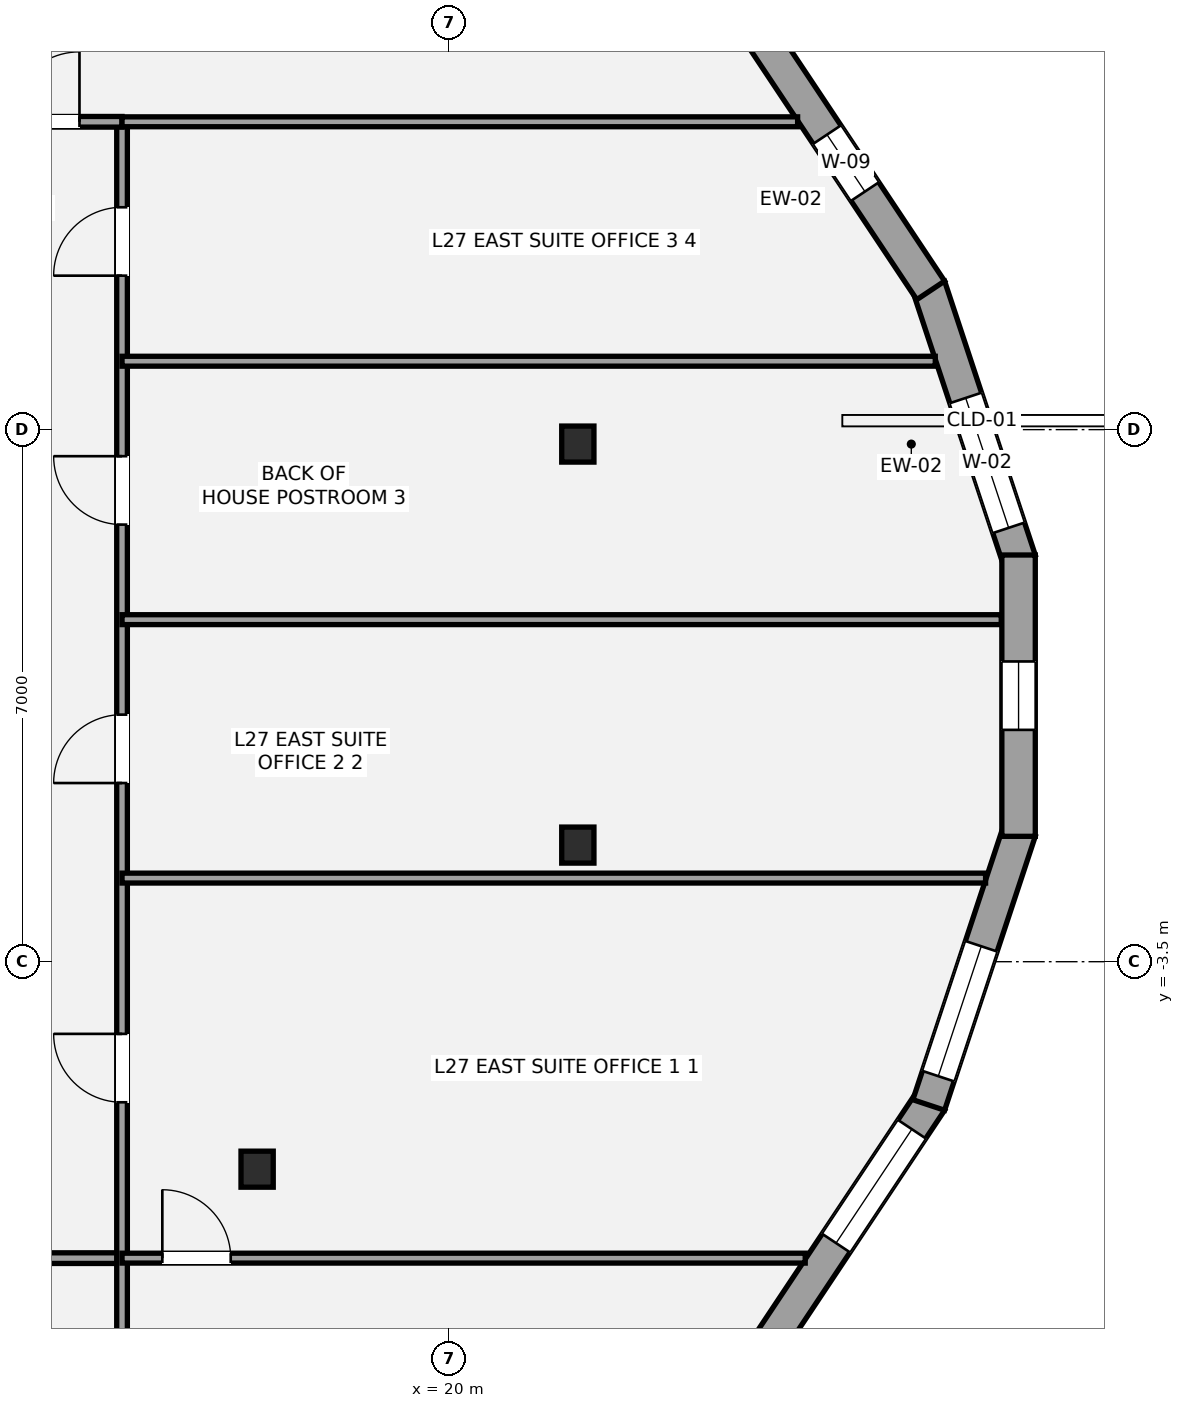
"""IFC4 building model, lengths in metres.
Left out: names, types, materials, properties, quantities, classifications, styles, units other than length and angle.
Written with IfcOpenShell. Run it as: python <this file> out.ifc"""

import sys

from ifc_helpers import new_model, si_unit, direction, frame, frame_2d, origin, origin_2d, place, context, subcontext, project, spatial, rectangle, i_section, extrude, element, fill, save


model = new_model("IFC4")
c1 = context("Model", 3, precision=1e-05, world=origin(), true_north=direction((0.0, 1.0)))
c2 = subcontext(c1, "Body", "Model", "MODEL_VIEW")
j1 = project(units=[si_unit("LENGTHUNIT", "METRE"), si_unit("PLANEANGLEUNIT", "RADIAN")], contexts=[c1])
p1 = place(None, origin())
s1 = spatial("IfcSite", under=j1, at=p1, CompositionType="ELEMENT")
p2 = place(p1, origin())
s2 = spatial("IfcBuilding", under=s1, at=p2, CompositionType="ELEMENT")
p3 = place(p2, frame((0.0, 0.0, 103.6)))
s3 = spatial("IfcBuildingStorey", under=s2, at=p3, CompositionType="ELEMENT", Elevation=103.6)
for number, where, z_axis, x_axis in (
    (1, (21.697, 3.31, 0.0), (0.0, 0.0, 1.0), (1.0, 0.0, 0.0)),
    (2, (17.477, -6.229, 0.0), (0.0, 0.0, 1.0), (1.0, 0.0, 0.0)),
    (3, (21.697, -1.966, 0.0), (0.0, 0.0, 1.0), (1.0, 0.0, 0.0)),
):
    element("IfcColumn", number, at=place(p3, frame(where, z_axis=z_axis, x_axis=x_axis)), inside=s3, PredefinedType="COLUMN", context=c2, shape_type="SweptSolid", body=[
        extrude(i_section(OverallWidth=0.424, OverallDepth=0.474, WebThickness=0.048, FlangeThickness=0.077, at=origin_2d()), origin(), (0.0, 0.0, 1.0), 3.5),
    ])
p4 = place(p3, frame((26.314, 5.385, 0.0), z_axis=(0.0, 0.0, 1.0), x_axis=(0.314316911692, -0.94931811266, 0.0)))
e4 = element("IfcWall", 4, at=p4, inside=s3, PredefinedType="STANDARD", context=c2, shape_type="SweptSolid", body=[
    extrude(rectangle(XDim=3.796, YDim=0.44, at=frame_2d((1.898, 0.0))), origin(), (0.0, 0.0, 1.0), 2.528),
])
p5 = place(p4, frame((1.547, 0.0, 0.65)))
e5 = element("IfcOpeningElement", 5, at=p5, cuts=e4, PredefinedType="OPENING", context=c2, shape_type="SweptSolid", body=[
    extrude(rectangle(XDim=1.8, YDim=1.7, at=frame_2d((0.9, 0.85))), frame((0.0, 0.23, 0.0), z_axis=(0.0, -1.0, 0.0), x_axis=(1.0, 0.0, 0.0)), (0.0, 0.0, 1.0), 0.46),
])
p6 = place(p3, frame((24.11, 8.68, 0.0), z_axis=(0.0, 0.0, 1.0), x_axis=(0.554293965046, -0.83232097193, 0.0)))
e6 = element("IfcWall", 6, at=p6, inside=s3, PredefinedType="STANDARD", context=c2, shape_type="SweptSolid", body=[
    extrude(rectangle(XDim=4.023, YDim=0.44, at=frame_2d((2.011, 0.0))), origin(), (0.0, 0.0, 1.0), 2.528),
])
p7 = place(p6, frame((1.561, 0.0, 0.58)))
e7 = element("IfcOpeningElement", 7, at=p7, cuts=e6, PredefinedType="OPENING", context=c2, shape_type="SweptSolid", body=[
    extrude(rectangle(XDim=0.9, YDim=1.35, at=frame_2d((0.45, 0.675))), frame((0.0, 0.23, 0.0), z_axis=(0.0, -1.0, 0.0), x_axis=(1.0, 0.0, 0.0)), (0.0, 0.0, 1.0), 0.46),
])
p8 = place(p3, frame((26.34, -5.332, 0.0), z_axis=(0.0, 0.0, 1.0), x_axis=(-0.554293965046, -0.83232097193, 0.0)))
e8 = element("IfcWall", 8, at=p8, inside=s3, PredefinedType="STANDARD", context=c2, shape_type="SweptSolid", body=[
    extrude(rectangle(XDim=4.023, YDim=0.44, at=frame_2d((2.011, 0.0))), origin(), (0.0, 0.0, 1.0), 2.528),
])
p9 = place(p8, frame((0.446, 0.0, 0.65)))
e9 = element("IfcOpeningElement", 9, at=p9, cuts=e8, PredefinedType="OPENING", context=c2, shape_type="SweptSolid", body=[
    extrude(rectangle(XDim=1.8, YDim=1.7, at=frame_2d((0.9, 0.85))), frame((0.0, 0.23, 0.0), z_axis=(0.0, -1.0, 0.0), x_axis=(1.0, 0.0, 0.0)), (0.0, 0.0, 1.0), 0.46),
])
p10 = place(p3, frame((27.507, -1.781, 0.0), z_axis=(0.0, 0.0, 1.0), x_axis=(-0.314316911692, -0.94931811266, 0.0)))
e10 = element("IfcWall", 10, at=p10, inside=s3, PredefinedType="STANDARD", context=c2, shape_type="SweptSolid", body=[
    extrude(rectangle(XDim=3.796, YDim=0.44, at=frame_2d((1.898, 0.0))), origin(), (0.0, 0.0, 1.0), 2.528),
])
p11 = place(p10, frame((1.596, 0.0, 0.65)))
e11 = element("IfcOpeningElement", 11, at=p11, cuts=e10, PredefinedType="OPENING", context=c2, shape_type="SweptSolid", body=[
    extrude(rectangle(XDim=1.8, YDim=1.7, at=frame_2d((0.9, 0.85))), frame((0.0, 0.23, 0.0), z_axis=(0.0, -1.0, 0.0), x_axis=(1.0, 0.0, 0.0)), (0.0, 0.0, 1.0), 0.46),
])
p12 = place(p3, frame((27.496, 1.851, 0.0), z_axis=(0.0, 0.0, 1.0), x_axis=(0.0, -1.0, 0.0)))
e12 = element("IfcWall", 12, at=p12, inside=s3, PredefinedType="STANDARD", context=c2, shape_type="SweptSolid", body=[
    extrude(rectangle(XDim=3.701, YDim=0.44, at=frame_2d((1.851, 0.0))), origin(), (0.0, 0.0, 1.0), 2.528),
])
p13 = place(p12, frame((1.4, 0.0, 0.58)))
e13 = element("IfcOpeningElement", 13, at=p13, cuts=e12, PredefinedType="OPENING", context=c2, shape_type="SweptSolid", body=[
    extrude(rectangle(XDim=0.9, YDim=1.35, at=frame_2d((0.45, 0.675))), frame((0.0, 0.23, 0.0), z_axis=(0.0, -1.0, 0.0), x_axis=(1.0, 0.0, 0.0)), (0.0, 0.0, 1.0), 0.46),
])
p14 = place(p3, frame((-17.5, -7.4, 0.0), z_axis=(0.0, 0.0, 1.0), x_axis=(1.0, 0.0, 0.0)))
e14 = element("IfcWall", 14, at=p14, inside=s3, PredefinedType="PARTITIONING", context=c2, shape_type="SweptSolid", body=[
    extrude(rectangle(XDim=33.2, YDim=0.14, at=frame_2d((16.6, 0.0))), origin(), (0.0, 0.0, 1.0), 2.688),
])
p15 = place(p14, frame((6.3, 0.0, 0.0)))
e15 = element("IfcOpeningElement", 15, at=p15, cuts=e14, PredefinedType="OPENING", context=c2, shape_type="SweptSolid", body=[
    extrude(rectangle(XDim=0.9, YDim=2.1, at=frame_2d((0.45, 1.05))), frame((0.0, 0.08, 0.0), z_axis=(0.0, -1.0, 0.0), x_axis=(1.0, 0.0, 0.0)), (0.0, 0.0, 1.0), 0.16),
])
p16 = place(p14, frame((18.05, 0.0, 0.0)))
e16 = element("IfcOpeningElement", 16, at=p16, cuts=e14, PredefinedType="OPENING", context=c2, shape_type="SweptSolid", body=[
    extrude(rectangle(XDim=0.9, YDim=2.1, at=frame_2d((0.45, 1.05))), frame((0.0, 0.08, 0.0), z_axis=(0.0, -1.0, 0.0), x_axis=(1.0, 0.0, 0.0)), (0.0, 0.0, 1.0), 0.16),
])
p17 = place(p14, frame((27.9, 0.0, 0.0)))
e17 = element("IfcOpeningElement", 17, at=p17, cuts=e14, PredefinedType="OPENING", context=c2, shape_type="SweptSolid", body=[
    extrude(rectangle(XDim=0.9, YDim=2.1, at=frame_2d((0.45, 1.05))), frame((0.0, 0.08, 0.0), z_axis=(0.0, -1.0, 0.0), x_axis=(1.0, 0.0, 0.0)), (0.0, 0.0, 1.0), 0.16),
])
p18 = place(p3, frame((15.7, -14.675, 0.0), z_axis=(0.0, 0.0, 1.0), x_axis=(0.0, 1.0, 0.0)))
e18 = element("IfcWall", 18, at=p18, inside=s3, PredefinedType="PARTITIONING", context=c2, shape_type="SweptSolid", body=[
    extrude(rectangle(XDim=22.225, YDim=0.14, at=frame_2d((11.112, 0.0))), origin(), (0.0, 0.0, 1.0), 2.763),
])
p19 = place(p18, frame((9.325, 0.0, 0.0)))
e19 = element("IfcOpeningElement", 19, at=p19, cuts=e18, PredefinedType="OPENING", context=c2, shape_type="SweptSolid", body=[
    extrude(rectangle(XDim=0.9, YDim=2.1, at=frame_2d((0.45, 1.05))), frame((0.0, 0.08, 0.0), z_axis=(0.0, -1.0, 0.0), x_axis=(1.0, 0.0, 0.0)), (0.0, 0.0, 1.0), 0.16),
])
p20 = place(p18, frame((13.525, 0.0, 0.0)))
e20 = element("IfcOpeningElement", 20, at=p20, cuts=e18, PredefinedType="OPENING", context=c2, shape_type="SweptSolid", body=[
    extrude(rectangle(XDim=0.9, YDim=2.1, at=frame_2d((0.45, 1.05))), frame((0.0, 0.08, 0.0), z_axis=(0.0, -1.0, 0.0), x_axis=(1.0, 0.0, 0.0)), (0.0, 0.0, 1.0), 0.16),
])
p21 = place(p18, frame((16.925, 0.0, 0.0)))
e21 = element("IfcOpeningElement", 21, at=p21, cuts=e18, PredefinedType="OPENING", context=c2, shape_type="SweptSolid", body=[
    extrude(rectangle(XDim=0.9, YDim=2.1, at=frame_2d((0.45, 1.05))), frame((0.0, 0.08, 0.0), z_axis=(0.0, -1.0, 0.0), x_axis=(1.0, 0.0, 0.0)), (0.0, 0.0, 1.0), 0.16),
])
p22 = place(p18, frame((20.2, 0.0, 0.0)))
e22 = element("IfcOpeningElement", 22, at=p22, cuts=e18, PredefinedType="OPENING", context=c2, shape_type="SweptSolid", body=[
    extrude(rectangle(XDim=0.9, YDim=2.1, at=frame_2d((0.45, 1.05))), frame((0.0, 0.08, 0.0), z_axis=(0.0, -1.0, 0.0), x_axis=(1.0, 0.0, 0.0)), (0.0, 0.0, 1.0), 0.16),
])
p23 = place(p3, frame((13.9, 7.55, 0.0), z_axis=(0.0, 0.0, 1.0), x_axis=(1.0, 0.0, 0.0)))
e23 = element("IfcWall", 23, at=p23, inside=s3, PredefinedType="PARTITIONING", context=c2, shape_type="SweptSolid", body=[
    extrude(rectangle(XDim=1.8, YDim=0.14, at=frame_2d((0.9, 0.0))), origin(), (0.0, 0.0, 1.0), 2.763),
])
p24 = place(p23, frame((0.32, 0.0, 0.0)))
e24 = element("IfcOpeningElement", 24, at=p24, cuts=e23, PredefinedType="OPENING", context=c2, shape_type="SweptSolid", body=[
    extrude(rectangle(XDim=0.92, YDim=2.15, at=frame_2d((0.46, 1.075))), frame((0.0, 0.08, 0.0), z_axis=(0.0, -1.0, 0.0), x_axis=(1.0, 0.0, 0.0)), (0.0, 0.0, 1.0), 0.16),
])
p25 = place(p3, frame((15.7, 7.55, 0.0), z_axis=(0.0, 0.0, 1.0), x_axis=(1.0, 0.0, 0.0)))
e25 = element("IfcWall", 25, at=p25, inside=s3, PredefinedType="PARTITIONING", context=c2, shape_type="SweptSolid", body=[
    extrude(rectangle(XDim=8.889, YDim=0.13, at=frame_2d((4.444, 0.0))), origin(), (0.0, 0.0, 1.0), 2.763),
])
p26 = place(p3, frame((15.7, -7.4, 0.0), z_axis=(0.0, 0.0, 1.0), x_axis=(1.0, 0.0, 0.0)))
e26 = element("IfcWall", 26, at=p26, inside=s3, PredefinedType="PARTITIONING", context=c2, shape_type="SweptSolid", body=[
    extrude(rectangle(XDim=8.989, YDim=0.13, at=frame_2d((4.494, 0.0))), origin(), (0.0, 0.0, 1.0), 2.763),
])
p27 = place(p26, frame((0.53, 0.0, 0.0)))
e27 = element("IfcOpeningElement", 27, at=p27, cuts=e26, PredefinedType="OPENING", context=c2, shape_type="SweptSolid", body=[
    extrude(rectangle(XDim=0.9, YDim=2.1, at=frame_2d((0.45, 1.05))), frame((0.0, 0.075, 0.0), z_axis=(0.0, -1.0, 0.0), x_axis=(1.0, 0.0, 0.0)), (0.0, 0.0, 1.0), 0.15),
])
p28 = place(p3, frame((15.7, -2.4, 0.0), z_axis=(0.0, 0.0, 1.0), x_axis=(1.0, 0.0, 0.0)))
e28 = element("IfcWall", 28, at=p28, inside=s3, PredefinedType="PARTITIONING", context=c2, shape_type="SweptSolid", body=[
    extrude(rectangle(XDim=11.362, YDim=0.13, at=frame_2d((5.681, 0.0))), origin(), (0.0, 0.0, 1.0), 2.688),
])
p29 = place(p3, frame((15.7, 1.0, 0.0), z_axis=(0.0, 0.0, 1.0), x_axis=(1.0, 0.0, 0.0)))
e29 = element("IfcWall", 29, at=p29, inside=s3, PredefinedType="PARTITIONING", context=c2, shape_type="SweptSolid", body=[
    extrude(rectangle(XDim=11.568, YDim=0.13, at=frame_2d((5.784, 0.0))), origin(), (0.0, 0.0, 1.0), 2.763),
])
p30 = place(p3, frame((15.7, 4.4, 0.0), z_axis=(0.0, 0.0, 1.0), x_axis=(1.0, 0.0, 0.0)))
e30 = element("IfcWall", 30, at=p30, inside=s3, PredefinedType="PARTITIONING", context=c2, shape_type="SweptSolid", body=[
    extrude(rectangle(XDim=10.7, YDim=0.13, at=frame_2d((5.35, 0.0))), origin(), (0.0, 0.0, 1.0), 2.763),
])
p31 = place(p5, origin())
e31 = element("IfcWindow", 31, at=p31, inside=s3, PartitioningType="SINGLE_PANEL", PredefinedType="WINDOW", context=c2, shape_type="SweptSolid", body=[
    extrude(rectangle(XDim=1.8, YDim=1.7, at=frame_2d((0.9, 0.85))), frame((0.0, -0.01, 0.0), z_axis=(0.0, -1.0, 0.0), x_axis=(1.0, 0.0, 0.0)), (0.0, 0.0, 1.0), 0.06),
])
fill(e5, e31)
p32 = place(p7, origin())
e32 = element("IfcWindow", 32, at=p32, inside=s3, PartitioningType="SINGLE_PANEL", PredefinedType="WINDOW", context=c2, shape_type="SweptSolid", body=[
    extrude(rectangle(XDim=0.9, YDim=1.35, at=frame_2d((0.45, 0.675))), frame((0.0, -0.01, 0.0), z_axis=(0.0, -1.0, 0.0), x_axis=(1.0, 0.0, 0.0)), (0.0, 0.0, 1.0), 0.06),
])
fill(e7, e32)
p33 = place(p9, origin())
e33 = element("IfcWindow", 33, at=p33, inside=s3, PartitioningType="SINGLE_PANEL", PredefinedType="WINDOW", context=c2, shape_type="SweptSolid", body=[
    extrude(rectangle(XDim=1.8, YDim=1.7, at=frame_2d((0.9, 0.85))), frame((0.0, -0.01, 0.0), z_axis=(0.0, -1.0, 0.0), x_axis=(1.0, 0.0, 0.0)), (0.0, 0.0, 1.0), 0.06),
])
fill(e9, e33)
p34 = place(p11, origin())
e34 = element("IfcWindow", 34, at=p34, inside=s3, PartitioningType="SINGLE_PANEL", PredefinedType="WINDOW", context=c2, shape_type="SweptSolid", body=[
    extrude(rectangle(XDim=1.8, YDim=1.7, at=frame_2d((0.9, 0.85))), frame((0.0, -0.01, 0.0), z_axis=(0.0, -1.0, 0.0), x_axis=(1.0, 0.0, 0.0)), (0.0, 0.0, 1.0), 0.06),
])
fill(e11, e34)
p35 = place(p13, origin())
e35 = element("IfcWindow", 35, at=p35, inside=s3, PartitioningType="SINGLE_PANEL", PredefinedType="WINDOW", context=c2, shape_type="SweptSolid", body=[
    extrude(rectangle(XDim=0.9, YDim=1.35, at=frame_2d((0.45, 0.675))), frame((0.0, -0.01, 0.0), z_axis=(0.0, -1.0, 0.0), x_axis=(1.0, 0.0, 0.0)), (0.0, 0.0, 1.0), 0.06),
])
fill(e13, e35)
p36 = place(p24, origin())
e36 = element("IfcDoor", 36, at=p36, inside=s3, OperationType="SINGLE_SWING_RIGHT", PredefinedType="DOOR", context=c2, shape_type="SweptSolid", body=[
    extrude(rectangle(XDim=0.92, YDim=2.15, at=frame_2d((0.46, 1.075))), frame((0.0, 0.025, 0.0), z_axis=(0.0, -1.0, 0.0), x_axis=(1.0, 0.0, 0.0)), (0.0, 0.0, 1.0), 0.05),
])
fill(e24, e36)
p37 = place(p27, origin())
e37 = element("IfcDoor", 37, at=p37, inside=s3, OperationType="SINGLE_SWING_LEFT", PredefinedType="DOOR", context=c2, shape_type="SweptSolid", body=[
    extrude(rectangle(XDim=0.9, YDim=2.1, at=frame_2d((0.45, 1.05))), frame((0.0, 0.025, 0.0), z_axis=(0.0, -1.0, 0.0), x_axis=(1.0, 0.0, 0.0)), (0.0, 0.0, 1.0), 0.05),
])
fill(e27, e37)
p38 = place(p19, origin())
e38 = element("IfcDoor", 38, at=p38, inside=s3, OperationType="SINGLE_SWING_RIGHT", PredefinedType="DOOR", context=c2, shape_type="SweptSolid", body=[
    extrude(rectangle(XDim=0.9, YDim=2.1, at=frame_2d((0.45, 1.05))), frame((0.0, 0.025, 0.0), z_axis=(0.0, -1.0, 0.0), x_axis=(1.0, 0.0, 0.0)), (0.0, 0.0, 1.0), 0.05),
])
fill(e19, e38)
p39 = place(p20, origin())
e39 = element("IfcDoor", 39, at=p39, inside=s3, OperationType="SINGLE_SWING_LEFT", PredefinedType="DOOR", context=c2, shape_type="SweptSolid", body=[
    extrude(rectangle(XDim=0.9, YDim=2.1, at=frame_2d((0.45, 1.05))), frame((0.0, 0.025, 0.0), z_axis=(0.0, -1.0, 0.0), x_axis=(1.0, 0.0, 0.0)), (0.0, 0.0, 1.0), 0.05),
])
fill(e20, e39)
p40 = place(p21, origin())
e40 = element("IfcDoor", 40, at=p40, inside=s3, OperationType="SINGLE_SWING_RIGHT", PredefinedType="DOOR", context=c2, shape_type="SweptSolid", body=[
    extrude(rectangle(XDim=0.9, YDim=2.1, at=frame_2d((0.45, 1.05))), frame((0.0, 0.025, 0.0), z_axis=(0.0, -1.0, 0.0), x_axis=(1.0, 0.0, 0.0)), (0.0, 0.0, 1.0), 0.05),
])
fill(e21, e40)
p41 = place(p22, origin())
e41 = element("IfcDoor", 41, at=p41, inside=s3, OperationType="SINGLE_SWING_LEFT", PredefinedType="DOOR", context=c2, shape_type="SweptSolid", body=[
    extrude(rectangle(XDim=0.9, YDim=2.1, at=frame_2d((0.45, 1.05))), frame((0.0, 0.025, 0.0), z_axis=(0.0, -1.0, 0.0), x_axis=(1.0, 0.0, 0.0)), (0.0, 0.0, 1.0), 0.05),
])
fill(e22, e41)
save(model, sys.argv[1])
